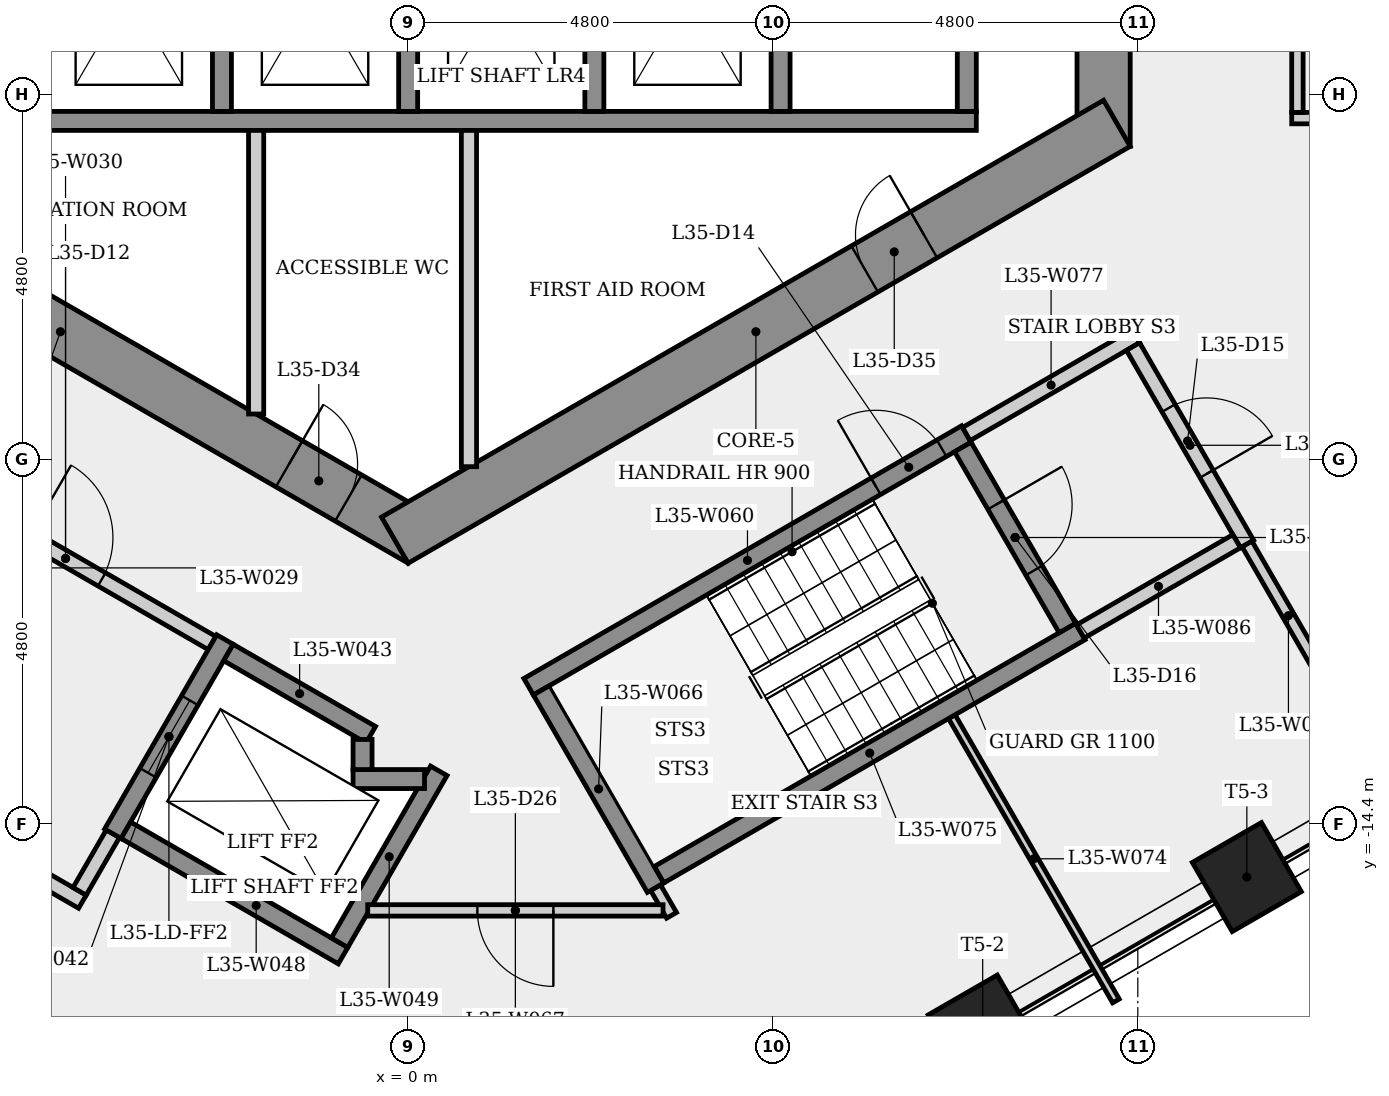
"""IFC4 building model, lengths in metres.
Left out: names, types, materials, properties, quantities, classifications, styles, units other than length and angle.
Written with IfcOpenShell. Run it as: python <this file> out.ifc"""

import sys

from ifc_helpers import new_model, si_unit, direction, frame, frame_2d, origin, origin_2d, place, context, subcontext, project, spatial, rectangle, extrude, element, fill, save


model = new_model("IFC4")
c1 = context("Model", 3, precision=1e-05, world=origin(), true_north=direction((0.0, 1.0)))
c2 = subcontext(c1, "Body", "Model", "MODEL_VIEW")
j1 = project(units=[si_unit("LENGTHUNIT", "METRE"), si_unit("PLANEANGLEUNIT", "RADIAN")], contexts=[c1])
p1 = place(None, origin())
s1 = spatial("IfcSite", under=j1, at=p1, CompositionType="ELEMENT")
p2 = place(p1, origin())
s2 = spatial("IfcBuilding", under=s1, at=p2, CompositionType="ELEMENT")
p3 = place(p2, frame((0.0, 0.0, 132.5)))
s3 = spatial("IfcBuildingStorey", under=s2, at=p3, CompositionType="ELEMENT", Elevation=132.5)
p4 = place(p3, frame((9.15, -5.485, 0.0), z_axis=(0.0, 0.0, 1.0), x_axis=(0.0, 1.0, 0.0)))
e1 = element("IfcWall", 1, at=p4, inside=s3, PredefinedType="SHEAR", context=c2, shape_type="SweptSolid", body=[
    extrude(rectangle(XDim=10.97, YDim=0.7, at=frame_2d((5.485, 0.0))), origin(), (0.0, 0.0, 1.0), 3.4),
])
p5 = place(p4, frame((4.685, 0.0, 0.0)))
e2 = element("IfcOpeningElement", 2, at=p5, cuts=e1, PredefinedType="OPENING", context=c2, shape_type="SweptSolid", body=[
    extrude(rectangle(XDim=1.6, YDim=2.1, at=frame_2d((0.8, 1.05))), frame((0.0, 0.36, 0.0), z_axis=(0.0, -1.0, 0.0), x_axis=(1.0, 0.0, 0.0)), (0.0, 0.0, 1.0), 0.72),
])
p6 = place(p3, frame((-9.325, -5.182, 0.0), z_axis=(0.0, 0.0, 1.0), x_axis=(0.866023993627, -0.500002442456, 0.0)))
e3 = element("IfcWall", 3, at=p6, inside=s3, PredefinedType="SHEAR", context=c2, shape_type="SweptSolid", body=[
    extrude(rectangle(XDim=10.97, YDim=0.7, at=frame_2d((5.485, 0.0))), origin(), (0.0, 0.0, 1.0), 3.4),
])
p7 = place(p6, frame((2.239, 0.0, 0.0)))
e4 = element("IfcOpeningElement", 4, at=p7, cuts=e3, PredefinedType="OPENING", context=c2, shape_type="SweptSolid", body=[
    extrude(rectangle(XDim=0.9, YDim=2.1, at=frame_2d((0.45, 1.05))), frame((0.0, 0.36, 0.0), z_axis=(0.0, -1.0, 0.0), x_axis=(1.0, 0.0, 0.0)), (0.0, 0.0, 1.0), 0.72),
])
p8 = place(p6, frame((8.96, 0.0, 0.0)))
e5 = element("IfcOpeningElement", 5, at=p8, cuts=e3, PredefinedType="OPENING", context=c2, shape_type="SweptSolid", body=[
    extrude(rectangle(XDim=0.9, YDim=2.1, at=frame_2d((0.45, 1.05))), frame((0.0, 0.36, 0.0), z_axis=(0.0, -1.0, 0.0), x_axis=(1.0, 0.0, 0.0)), (0.0, 0.0, 1.0), 0.72),
])
p9 = place(p3, frame((-0.175, -10.667, 0.0), z_axis=(0.0, 0.0, 1.0), x_axis=(0.866023993627, 0.500002442456, 0.0)))
e6 = element("IfcWall", 6, at=p9, inside=s3, PredefinedType="SHEAR", context=c2, shape_type="SweptSolid", body=[
    extrude(rectangle(XDim=10.97, YDim=0.7, at=frame_2d((5.485, 0.0))), origin(), (0.0, 0.0, 1.0), 3.4),
])
p10 = place(p9, frame((7.137, 0.0, 0.0)))
e7 = element("IfcOpeningElement", 7, at=p10, cuts=e6, PredefinedType="OPENING", context=c2, shape_type="SweptSolid", body=[
    extrude(rectangle(XDim=0.9, YDim=2.1, at=frame_2d((0.45, 1.05))), frame((0.0, 0.36, 0.0), z_axis=(0.0, -1.0, 0.0), x_axis=(1.0, 0.0, 0.0)), (0.0, 0.0, 1.0), 0.72),
])
for number, where, z_axis, x_axis in (
    (8, (7.559, -17.106, 0.0), (0.0, 0.0, 1.0), (0.5, -0.866, 0.0)),
    (9, (11.035, -15.099, 0.0), (0.0, 0.0, 1.0), (0.5, -0.866, 0.0)),
):
    element("IfcColumn", number, at=place(p3, frame(where, z_axis=z_axis, x_axis=x_axis)), inside=s3, PredefinedType="COLUMN", context=c2, shape_type="SweptSolid", body=[
        extrude(rectangle(XDim=1.05, YDim=1.05, at=origin_2d()), origin(), (0.0, 0.0, 1.0), 3.4),
    ])
p11 = place(p3, frame((-6.435, -9.795, 0.0), z_axis=(0.0, 0.0, 1.0), x_axis=(0.866012907634, -0.500021643343, 0.0)))
e10 = element("IfcWall", 10, at=p11, inside=s3, PredefinedType="PARTITIONING", context=c2, shape_type="SweptSolid", body=[
    extrude(rectangle(XDim=4.45, YDim=0.2, at=frame_2d((2.225, 0.0))), origin(), (0.0, 0.0, 1.0), 3.0),
])
p12 = place(p11, frame((1.675, 0.0, 0.0)))
e11 = element("IfcOpeningElement", 11, at=p12, cuts=e10, PredefinedType="OPENING", context=c2, shape_type="SweptSolid", body=[
    extrude(rectangle(XDim=1.1, YDim=2.1, at=frame_2d((0.55, 1.05))), frame((0.0, 0.11, 0.0), z_axis=(0.0, -1.0, 0.0), x_axis=(1.0, 0.0, 0.0)), (0.0, 0.0, 1.0), 0.22),
])
p13 = place(p3, frame((-7.225, -5.15, 0.0), z_axis=(0.0, 0.0, 1.0), x_axis=(1.0, 0.0, 0.0)))
e12 = element("IfcWall", 12, at=p13, inside=s3, PredefinedType="SHEAR", context=c2, shape_type="SweptSolid", body=[
    extrude(rectangle(XDim=14.7, YDim=0.25, at=frame_2d((7.35, 0.0))), origin(), (0.0, 0.0, 1.0), 3.0),
])
p14 = place(p3, frame((-4.286, -15.423, 0.0), z_axis=(0.0, 0.0, 1.0), x_axis=(-0.866025371046, 0.500000056704, 0.0)))
e13 = element("IfcWall", 13, at=p14, inside=s3, PredefinedType="PARTITIONING", context=c2, shape_type="SweptSolid", body=[
    extrude(rectangle(XDim=1.7, YDim=0.2, at=frame_2d((0.85, 0.0))), origin(), (0.0, 0.0, 1.0), 3.0),
])
p15 = place(p3, frame((-3.885, -14.529, 0.0), z_axis=(0.0, 0.0, 1.0), x_axis=(-0.499859285417, -0.866106630146, 0.0)))
e14 = element("IfcWall", 14, at=p15, inside=s3, PredefinedType="PARTITIONING", context=c2, shape_type="SweptSolid", body=[
    extrude(rectangle(XDim=0.875, YDim=0.2, at=frame_2d((0.438, 0.0))), origin(), (0.0, 0.0, 1.0), 3.0),
])
p16 = place(p3, frame((-2.41, -11.974, 0.0), z_axis=(0.0, 0.0, 1.0), x_axis=(-0.500001826776, -0.866024349092, 0.0)))
e15 = element("IfcWall", 15, at=p16, inside=s3, PredefinedType="SHEAR", context=c2, shape_type="SweptSolid", body=[
    extrude(rectangle(XDim=2.95, YDim=0.25, at=frame_2d((1.475, 0.0))), origin(), (0.0, 0.0, 1.0), 3.0),
])
p17 = place(p16, frame((0.925, 0.0, 0.0)))
e16 = element("IfcOpeningElement", 16, at=p17, cuts=e15, PredefinedType="OPENING", context=c2, shape_type="SweptSolid", body=[
    extrude(rectangle(XDim=1.1, YDim=2.1, at=frame_2d((0.55, 1.05))), frame((0.0, 0.135, 0.0), z_axis=(0.0, -1.0, 0.0), x_axis=(1.0, 0.0, 0.0)), (0.0, 0.0, 1.0), 0.27),
])
p18 = place(p3, frame((-2.364, -12.145, 0.0), z_axis=(0.0, 0.0, 1.0), x_axis=(0.86603892542, -0.499976579108, 0.0)))
e17 = element("IfcWall", 17, at=p18, inside=s3, PredefinedType="SHEAR", context=c2, shape_type="SweptSolid", body=[
    extrude(rectangle(XDim=2.162, YDim=0.25, at=frame_2d((1.081, 0.0))), origin(), (0.0, 0.0, 1.0), 3.0),
])
p19 = place(p3, frame((-2.45, -1.925, 0.0), z_axis=(0.0, 0.0, 1.0), x_axis=(0.0, -1.0, 0.0)))
e18 = element("IfcWall", 18, at=p19, inside=s3, PredefinedType="SHEAR", context=c2, shape_type="SweptSolid", body=[
    extrude(rectangle(XDim=3.1, YDim=0.25, at=frame_2d((1.55, 0.0))), origin(), (0.0, 0.0, 1.0), 3.4),
])
p20 = place(p3, frame((-2.0, -5.275, 0.0), z_axis=(0.0, 0.0, 1.0), x_axis=(0.0, -1.0, 0.0)))
e19 = element("IfcWall", 19, at=p20, inside=s3, PredefinedType="PARTITIONING", context=c2, shape_type="SweptSolid", body=[
    extrude(rectangle(XDim=3.732, YDim=0.2, at=frame_2d((1.866, 0.0))), origin(), (0.0, 0.0, 1.0), 3.0),
])
p21 = place(p3, frame((-0.856, -16.133, 0.0), z_axis=(0.0, 0.0, 1.0), x_axis=(-0.866021716278, 0.500006386895, 0.0)))
e20 = element("IfcWall", 20, at=p21, inside=s3, PredefinedType="SHEAR", context=c2, shape_type="SweptSolid", body=[
    extrude(rectangle(XDim=3.3, YDim=0.25, at=frame_2d((1.65, 0.0))), origin(), (0.0, 0.0, 1.0), 3.0),
])
p22 = place(p3, frame((-0.902, -15.962, 0.0), z_axis=(0.0, 0.0, 1.0), x_axis=(0.499981517636, 0.866036074319, 0.0)))
e21 = element("IfcWall", 21, at=p22, inside=s3, PredefinedType="SHEAR", context=c2, shape_type="SweptSolid", body=[
    extrude(rectangle(XDim=2.61, YDim=0.25, at=frame_2d((1.305, 0.0))), origin(), (0.0, 0.0, 1.0), 3.0),
])
p23 = place(p3, frame((-0.725, -13.81, 0.0), z_axis=(0.0, 0.0, 1.0), x_axis=(1.0, 0.0, 0.0)))
e22 = element("IfcWall", 22, at=p23, inside=s3, PredefinedType="SHEAR", context=c2, shape_type="SweptSolid", body=[
    extrude(rectangle(XDim=0.941, YDim=0.25, at=frame_2d((0.47, 0.0))), origin(), (0.0, 0.0, 1.0), 3.4),
])
p24 = place(p3, frame((-0.6, -13.289, 0.0), z_axis=(0.0, 0.0, 1.0), x_axis=(0.0, -1.0, 0.0)))
e23 = element("IfcWall", 23, at=p24, inside=s3, PredefinedType="SHEAR", context=c2, shape_type="SweptSolid", body=[
    extrude(rectangle(XDim=0.396, YDim=0.25, at=frame_2d((0.198, 0.0))), origin(), (0.0, 0.0, 1.0), 3.4),
])
p25 = place(p3, frame((0.0, -1.925, 0.0), z_axis=(0.0, 0.0, 1.0), x_axis=(0.0, -1.0, 0.0)))
e24 = element("IfcWall", 24, at=p25, inside=s3, PredefinedType="SHEAR", context=c2, shape_type="SweptSolid", body=[
    extrude(rectangle(XDim=3.1, YDim=0.25, at=frame_2d((1.55, 0.0))), origin(), (0.0, 0.0, 1.0), 3.4),
])
p26 = place(p3, frame((0.8, -5.275, 0.0), z_axis=(0.0, 0.0, 1.0), x_axis=(0.0, -1.0, 0.0)))
e25 = element("IfcWall", 25, at=p26, inside=s3, PredefinedType="PARTITIONING", context=c2, shape_type="SweptSolid", body=[
    extrude(rectangle(XDim=4.425, YDim=0.2, at=frame_2d((2.212, 0.0))), origin(), (0.0, 0.0, 1.0), 3.0),
])
p27 = place(p3, frame((1.585, -12.595, 0.0), z_axis=(0.0, 0.0, 1.0), x_axis=(0.866036417653, 0.499980922934, 0.0)))
e26 = element("IfcWall", 26, at=p27, inside=s3, PredefinedType="SHEAR", context=c2, shape_type="SweptSolid", body=[
    extrude(rectangle(XDim=6.65, YDim=0.25, at=frame_2d((3.325, 0.0))), origin(), (0.0, 0.0, 1.0), 3.0),
])
p28 = place(p27, frame((5.275, 0.0, 0.0)))
e27 = element("IfcOpeningElement", 27, at=p28, cuts=e26, PredefinedType="OPENING", context=c2, shape_type="SweptSolid", body=[
    extrude(rectangle(XDim=1.0, YDim=2.1, at=frame_2d((0.5, 1.05))), frame((0.0, 0.135, 0.0), z_axis=(0.0, -1.0, 0.0), x_axis=(1.0, 0.0, 0.0)), (0.0, 0.0, 1.0), 0.27),
])
p29 = place(p3, frame((2.45, -1.925, 0.0), z_axis=(0.0, 0.0, 1.0), x_axis=(0.0, -1.0, 0.0)))
e28 = element("IfcWall", 28, at=p29, inside=s3, PredefinedType="SHEAR", context=c2, shape_type="SweptSolid", body=[
    extrude(rectangle(XDim=3.1, YDim=0.25, at=frame_2d((1.55, 0.0))), origin(), (0.0, 0.0, 1.0), 3.4),
])
p30 = place(p3, frame((3.256, -15.239, 0.0), z_axis=(0.0, 0.0, 1.0), x_axis=(0.499822960955, -0.8661275932, 0.0)))
e29 = element("IfcWall", 29, at=p30, inside=s3, PredefinedType="PARTITIONING", context=c2, shape_type="SweptSolid", body=[
    extrude(rectangle(XDim=0.421, YDim=0.15, at=frame_2d((0.21, 0.0))), origin(), (0.0, 0.0, 1.0), 3.0),
])
p31 = place(p3, frame((3.256, -15.239, 0.0), z_axis=(0.0, 0.0, 1.0), x_axis=(-0.50002537861, 0.866010750942, 0.0)))
e30 = element("IfcWall", 30, at=p31, inside=s3, PredefinedType="SHEAR", context=c2, shape_type="SweptSolid", body=[
    extrude(rectangle(XDim=3.0, YDim=0.25, at=frame_2d((1.5, 0.0))), origin(), (0.0, 0.0, 1.0), 3.0),
])
p32 = place(p3, frame((3.353, -15.538, 0.0), z_axis=(0.0, 0.0, 1.0), x_axis=(-1.0, 0.0, 0.0)))
e31 = element("IfcWall", 31, at=p32, inside=s3, PredefinedType="PARTITIONING", context=c2, shape_type="SweptSolid", body=[
    extrude(rectangle(XDim=3.885, YDim=0.15, at=frame_2d((1.943, 0.0))), origin(), (0.0, 0.0, 1.0), 3.0),
])
p33 = place(p32, frame((1.443, 0.0, 0.0)))
e32 = element("IfcOpeningElement", 32, at=p33, cuts=e31, PredefinedType="OPENING", context=c2, shape_type="SweptSolid", body=[
    extrude(rectangle(XDim=1.0, YDim=2.1, at=frame_2d((0.5, 1.05))), frame((0.0, 0.085, 0.0), z_axis=(0.0, -1.0, 0.0), x_axis=(1.0, 0.0, 0.0)), (0.0, 0.0, 1.0), 0.17),
])
p34 = place(p3, frame((4.9, -1.925, 0.0), z_axis=(0.0, 0.0, 1.0), x_axis=(0.0, -1.0, 0.0)))
e33 = element("IfcWall", 33, at=p34, inside=s3, PredefinedType="SHEAR", context=c2, shape_type="SweptSolid", body=[
    extrude(rectangle(XDim=3.1, YDim=0.25, at=frame_2d((1.55, 0.0))), origin(), (0.0, 0.0, 1.0), 3.4),
])
p35 = place(p3, frame((7.153, -12.989, 0.0), z_axis=(0.0, 0.0, 1.0), x_axis=(0.499993182398, -0.866029339893, 0.0)))
e34 = element("IfcWall", 34, at=p35, inside=s3, PredefinedType="PARTITIONING", context=c2, shape_type="SweptSolid", body=[
    extrude(rectangle(XDim=4.319, YDim=0.1, at=frame_2d((2.16, 0.0))), origin(), (0.0, 0.0, 1.0), 3.0),
])
p36 = place(p3, frame((3.301, -15.068, 0.0), z_axis=(0.0, 0.0, 1.0), x_axis=(0.866035036182, 0.499983315828, 0.0)))
e35 = element("IfcWall", 35, at=p36, inside=s3, PredefinedType="SHEAR", context=c2, shape_type="SweptSolid", body=[
    extrude(rectangle(XDim=6.4, YDim=0.25, at=frame_2d((3.2, 0.0))), origin(), (0.0, 0.0, 1.0), 3.0),
])
p37 = place(p3, frame((7.298, -9.441, 0.0), z_axis=(0.0, 0.0, 1.0), x_axis=(0.500034990121, -0.866005201286, 0.0)))
e36 = element("IfcWall", 36, at=p37, inside=s3, PredefinedType="SHEAR", context=c2, shape_type="SweptSolid", body=[
    extrude(rectangle(XDim=2.75, YDim=0.25, at=frame_2d((1.375, 0.0))), origin(), (0.0, 0.0, 1.0), 3.0),
])
p38 = place(p37, frame((0.875, 0.0, 0.0)))
e37 = element("IfcOpeningElement", 37, at=p38, cuts=e36, PredefinedType="OPENING", context=c2, shape_type="SweptSolid", body=[
    extrude(rectangle(XDim=1.0, YDim=2.1, at=frame_2d((0.5, 1.05))), frame((0.0, 0.135, 0.0), z_axis=(0.0, -1.0, 0.0), x_axis=(1.0, 0.0, 0.0)), (0.0, 0.0, 1.0), 0.27),
])
p39 = place(p3, frame((7.344, -9.27, 0.0), z_axis=(0.0, 0.0, 1.0), x_axis=(0.866005588531, 0.500034319456, 0.0)))
e38 = element("IfcWall", 38, at=p39, inside=s3, PredefinedType="PARTITIONING", context=c2, shape_type="SweptSolid", body=[
    extrude(rectangle(XDim=2.575, YDim=0.2, at=frame_2d((1.288, 0.0))), origin(), (0.0, 0.0, 1.0), 3.0),
])
p40 = place(p3, frame((7.35, -1.925, 0.0), z_axis=(0.0, 0.0, 1.0), x_axis=(0.0, -1.0, 0.0)))
e39 = element("IfcWall", 39, at=p40, inside=s3, PredefinedType="SHEAR", context=c2, shape_type="SweptSolid", body=[
    extrude(rectangle(XDim=3.1, YDim=0.25, at=frame_2d((1.55, 0.0))), origin(), (0.0, 0.0, 1.0), 3.4),
])
p41 = place(p3, frame((9.537, -8.119, 0.0), z_axis=(0.0, 0.0, 1.0), x_axis=(0.499990139034, -0.866031096941, 0.0)))
e40 = element("IfcWall", 40, at=p41, inside=s3, PredefinedType="PARTITIONING", context=c2, shape_type="SweptSolid", body=[
    extrude(rectangle(XDim=3.0, YDim=0.2, at=frame_2d((1.5, 0.0))), origin(), (0.0, 0.0, 1.0), 3.0),
])
p42 = place(p41, frame((0.935, 0.0, 0.0)))
e41 = element("IfcOpeningElement", 41, at=p42, cuts=e40, PredefinedType="OPENING", context=c2, shape_type="SweptSolid", body=[
    extrude(rectangle(XDim=1.0, YDim=2.1, at=frame_2d((0.5, 1.05))), frame((0.0, 0.11, 0.0), z_axis=(0.0, -1.0, 0.0), x_axis=(1.0, 0.0, 0.0)), (0.0, 0.0, 1.0), 0.22),
])
p43 = place(p3, frame((10.901, -10.681, 0.0), z_axis=(0.0, 0.0, 1.0), x_axis=(-0.866007538022, -0.500030943131, 0.0)))
e42 = element("IfcWall", 42, at=p43, inside=s3, PredefinedType="PARTITIONING", context=c2, shape_type="SweptSolid", body=[
    extrude(rectangle(XDim=2.375, YDim=0.2, at=frame_2d((1.188, 0.0))), origin(), (0.0, 0.0, 1.0), 3.0),
])
p44 = place(p3, frame((11.625, -5.113, 0.0), z_axis=(0.0, 0.0, 1.0), x_axis=(1.0, 0.0, 0.0)))
e43 = element("IfcWall", 43, at=p44, inside=s3, PredefinedType="PARTITIONING", context=c2, shape_type="SweptSolid", body=[
    extrude(rectangle(XDim=4.825, YDim=0.15, at=frame_2d((2.413, 0.0))), origin(), (0.0, 0.0, 1.0), 3.0),
])
p45 = place(p3, frame((11.7, -5.038, 0.0), z_axis=(0.0, 0.0, 1.0), x_axis=(0.0, 1.0, 0.0)))
e44 = element("IfcWall", 44, at=p45, inside=s3, PredefinedType="PARTITIONING", context=c2, shape_type="SweptSolid", body=[
    extrude(rectangle(XDim=10.227, YDim=0.15, at=frame_2d((5.113, 0.0))), origin(), (0.0, 0.0, 1.0), 3.0),
])
p46 = place(p45, frame((2.856, 0.0, 0.0)))
e45 = element("IfcOpeningElement", 45, at=p46, cuts=e44, PredefinedType="OPENING", context=c2, shape_type="SweptSolid", body=[
    extrude(rectangle(XDim=1.0, YDim=2.1, at=frame_2d((0.5, 1.05))), frame((0.0, 0.085, 0.0), z_axis=(0.0, -1.0, 0.0), x_axis=(1.0, 0.0, 0.0)), (0.0, 0.0, 1.0), 0.17),
])
p47 = place(p3, frame((12.126, -12.603, 0.0), z_axis=(0.0, 0.0, 1.0), x_axis=(-0.499997407846, 0.86602690036, 0.0)))
e46 = element("IfcWall", 46, at=p47, inside=s3, PredefinedType="PARTITIONING", context=c2, shape_type="SweptSolid", body=[
    extrude(rectangle(XDim=2.178, YDim=0.15, at=frame_2d((1.089, 0.0))), origin(), (0.0, 0.0, 1.0), 3.0),
])
p48 = place(p12, origin())
e47 = element("IfcDoor", 47, at=p48, inside=s3, OperationType="SINGLE_SWING_LEFT", PredefinedType="DOOR", context=c2, shape_type="SweptSolid", body=[
    extrude(rectangle(XDim=1.1, YDim=2.1, at=frame_2d((0.55, 1.05))), frame((0.0, 0.025, 0.0), z_axis=(0.0, -1.0, 0.0), x_axis=(1.0, 0.0, 0.0)), (0.0, 0.0, 1.0), 0.05),
])
fill(e11, e47)
p49 = place(p17, origin())
e48 = element("IfcDoor", 48, at=p49, inside=s3, OperationType="SLIDING_TO_LEFT", PredefinedType="DOOR", context=c2, shape_type="SweptSolid", body=[
    extrude(rectangle(XDim=1.1, YDim=2.1, at=frame_2d((0.55, 1.05))), frame((0.0, 0.025, 0.0), z_axis=(0.0, -1.0, 0.0), x_axis=(1.0, 0.0, 0.0)), (0.0, 0.0, 1.0), 0.05),
])
fill(e16, e48)
p50 = place(p28, origin())
e49 = element("IfcDoor", 49, at=p50, inside=s3, OperationType="SINGLE_SWING_LEFT", PredefinedType="DOOR", context=c2, shape_type="SweptSolid", body=[
    extrude(rectangle(XDim=1.0, YDim=2.1, at=frame_2d((0.5, 1.05))), frame((0.0, 0.025, 0.0), z_axis=(0.0, -1.0, 0.0), x_axis=(1.0, 0.0, 0.0)), (0.0, 0.0, 1.0), 0.05),
])
fill(e27, e49)
p51 = place(p42, origin())
e50 = element("IfcDoor", 50, at=p51, inside=s3, OperationType="SINGLE_SWING_RIGHT", PredefinedType="DOOR", context=c2, shape_type="SweptSolid", body=[
    extrude(rectangle(XDim=1.0, YDim=2.1, at=frame_2d((0.5, 1.05))), frame((0.0, 0.025, 0.0), z_axis=(0.0, -1.0, 0.0), x_axis=(1.0, 0.0, 0.0)), (0.0, 0.0, 1.0), 0.05),
])
fill(e41, e50)
p52 = place(p38, origin())
e51 = element("IfcDoor", 51, at=p52, inside=s3, OperationType="SINGLE_SWING_LEFT", PredefinedType="DOOR", context=c2, shape_type="SweptSolid", body=[
    extrude(rectangle(XDim=1.0, YDim=2.1, at=frame_2d((0.5, 1.05))), frame((0.0, 0.025, 0.0), z_axis=(0.0, -1.0, 0.0), x_axis=(1.0, 0.0, 0.0)), (0.0, 0.0, 1.0), 0.05),
])
fill(e37, e51)
p53 = place(p33, origin())
e52 = element("IfcDoor", 52, at=p53, inside=s3, OperationType="SINGLE_SWING_LEFT", PredefinedType="DOOR", context=c2, shape_type="SweptSolid", body=[
    extrude(rectangle(XDim=1.0, YDim=2.1, at=frame_2d((0.5, 1.05))), frame((0.0, 0.025, 0.0), z_axis=(0.0, -1.0, 0.0), x_axis=(1.0, 0.0, 0.0)), (0.0, 0.0, 1.0), 0.05),
])
fill(e32, e52)
p54 = place(p8, origin())
e53 = element("IfcDoor", 53, at=p54, inside=s3, OperationType="SINGLE_SWING_LEFT", PredefinedType="DOOR", context=c2, shape_type="SweptSolid", body=[
    extrude(rectangle(XDim=0.9, YDim=2.1, at=frame_2d((0.45, 1.05))), frame((0.0, 0.025, 0.0), z_axis=(0.0, -1.0, 0.0), x_axis=(1.0, 0.0, 0.0)), (0.0, 0.0, 1.0), 0.05),
])
fill(e5, e53)
p55 = place(p10, origin())
e54 = element("IfcDoor", 54, at=p55, inside=s3, OperationType="SINGLE_SWING_RIGHT", PredefinedType="DOOR", context=c2, shape_type="SweptSolid", body=[
    extrude(rectangle(XDim=0.9, YDim=2.1, at=frame_2d((0.45, 1.05))), frame((0.0, 0.025, 0.0), z_axis=(0.0, -1.0, 0.0), x_axis=(1.0, 0.0, 0.0)), (0.0, 0.0, 1.0), 0.05),
])
fill(e7, e54)
save(model, sys.argv[1])
